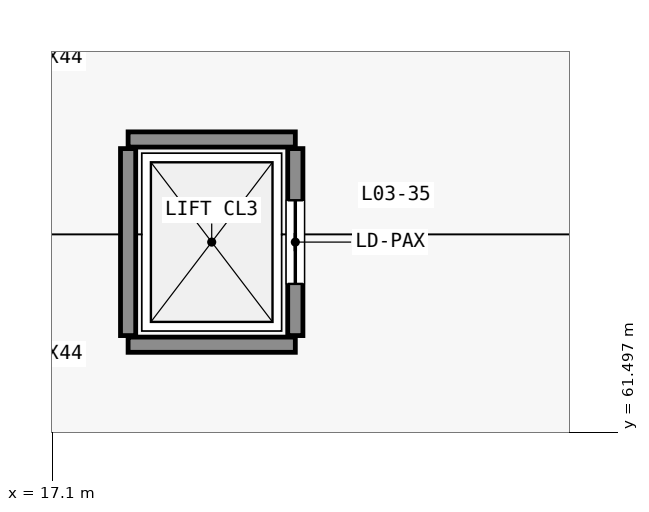
"""IFC4 building model, lengths in metres.
Left out: names, types, materials, properties, quantities, classifications, styles, units other than length and angle.
Written with IfcOpenShell. Run it as: python <this file> out.ifc"""

import sys

from ifc_helpers import new_model, si_unit, direction, frame, frame_2d, origin, place, context, subcontext, project, spatial, rectangle, extrude, element, fill, save


model = new_model("IFC4")
c1 = context("Model", 3, precision=1e-05, world=origin(), true_north=direction((0.0, 1.0)))
c2 = subcontext(c1, "Body", "Model", "MODEL_VIEW")
j1 = project(units=[si_unit("LENGTHUNIT", "METRE"), si_unit("PLANEANGLEUNIT", "RADIAN")], contexts=[c1])
p1 = place(None, origin())
s1 = spatial("IfcSite", under=j1, at=p1, CompositionType="ELEMENT")
p2 = place(p1, origin())
s2 = spatial("IfcBuilding", under=s1, at=p2, CompositionType="ELEMENT")
p3 = place(p2, frame((0.0, 0.0, 16.2)))
s3 = spatial("IfcBuildingStorey", under=s2, at=p3, CompositionType="ELEMENT", Elevation=16.2)
for number, where, z_axis, x_axis in (
    (1, (18.1, 62.65, 0.0), (0.0, 0.0, 1.0), (1.0, 0.0, 0.0)),
    (2, (18.1, 65.35, 0.0), (0.0, 0.0, 1.0), (1.0, 0.0, 0.0)),
):
    element("IfcWall", number, at=place(p3, frame(where, z_axis=z_axis, x_axis=x_axis)), inside=s3, PredefinedType="STANDARD", context=c2, shape_type="SweptSolid", body=[
        extrude(rectangle(XDim=2.2, YDim=0.2, at=frame_2d((1.1, 0.0))), origin(), (0.0, 0.0, 1.0), 4.44),
    ])
p4 = place(p3, frame((18.1, 62.77, 0.0), z_axis=(0.0, 0.0, 1.0), x_axis=(0.0, 1.0, 0.0)))
e3 = element("IfcWall", 3, at=p4, inside=s3, PredefinedType="STANDARD", context=c2, shape_type="SweptSolid", body=[
    extrude(rectangle(XDim=2.46, YDim=0.2, at=frame_2d((1.23, 0.0))), origin(), (0.0, 0.0, 1.0), 4.44),
])
p5 = place(p3, frame((20.3, 62.77, 0.0), z_axis=(0.0, 0.0, 1.0), x_axis=(0.0, 1.0, 0.0)))
e4 = element("IfcWall", 4, at=p5, inside=s3, PredefinedType="STANDARD", context=c2, shape_type="SweptSolid", body=[
    extrude(rectangle(XDim=2.46, YDim=0.2, at=frame_2d((1.23, 0.0))), origin(), (0.0, 0.0, 1.0), 4.44),
])
p6 = place(p5, frame((0.68, 0.0, 0.0)))
e5 = element("IfcOpeningElement", 5, at=p6, cuts=e4, PredefinedType="OPENING", context=c2, shape_type="SweptSolid", body=[
    extrude(rectangle(XDim=1.1, YDim=2.15, at=frame_2d((0.55, 1.075))), frame((0.0, 0.11, 0.0), z_axis=(0.0, -1.0, 0.0), x_axis=(1.0, 0.0, 0.0)), (0.0, 0.0, 1.0), 0.22),
])
p7 = place(p6, origin())
e6 = element("IfcDoor", 6, at=p7, inside=s3, OperationType="SLIDING_TO_LEFT", PredefinedType="DOOR", context=c2, shape_type="SweptSolid", body=[
    extrude(rectangle(XDim=1.1, YDim=2.15, at=frame_2d((0.55, 1.075))), frame((0.0, 0.025, 0.0), z_axis=(0.0, -1.0, 0.0), x_axis=(1.0, 0.0, 0.0)), (0.0, 0.0, 1.0), 0.05),
])
fill(e5, e6)
save(model, sys.argv[1])
